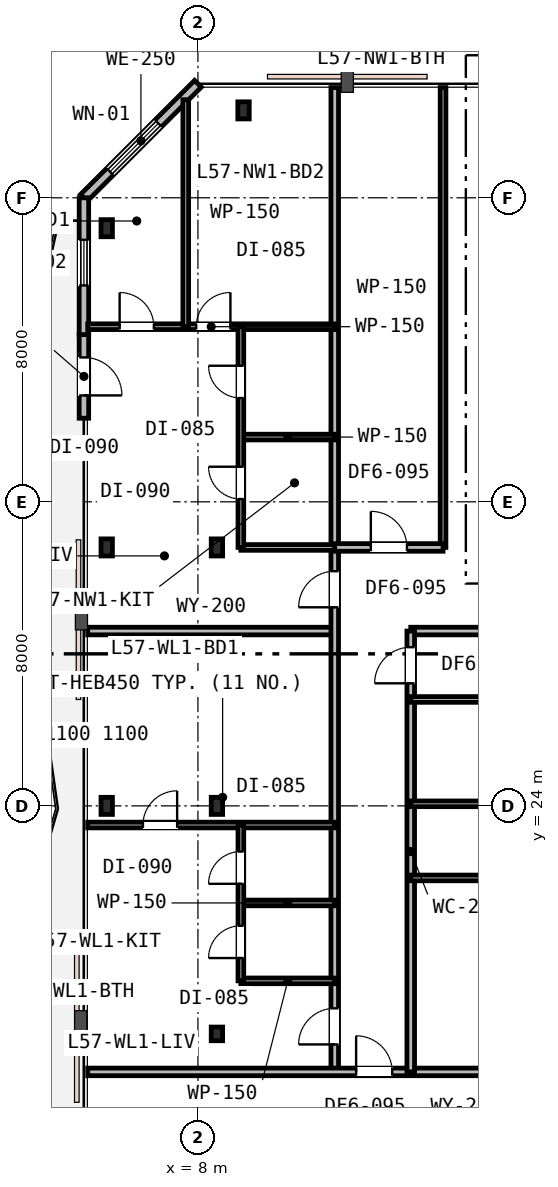
"""IFC4 building model, lengths in metres.
Left out: names, types, materials, properties, quantities, classifications, styles, units other than length and angle.
Written with IfcOpenShell. Run it as: python <this file> out.ifc"""

import sys

from ifc_helpers import new_model, si_unit, direction, frame, frame_2d, origin, origin_2d, place, context, subcontext, project, spatial, rectangle, i_section, extrude, element, fill, save


model = new_model("IFC4")
c1 = context("Model", 3, precision=1e-05, world=origin(), true_north=direction((0.0, 1.0)))
c2 = subcontext(c1, "Body", "Model", "MODEL_VIEW")
j1 = project(units=[si_unit("LENGTHUNIT", "METRE"), si_unit("PLANEANGLEUNIT", "RADIAN")], contexts=[c1])
p1 = place(None, origin())
s1 = spatial("IfcSite", under=j1, at=p1, CompositionType="ELEMENT")
p2 = place(p1, origin())
s2 = spatial("IfcBuilding", under=s1, at=p2, CompositionType="ELEMENT")
p3 = place(p2, frame((0.0, 0.0, 222.2)))
s3 = spatial("IfcBuildingStorey", under=s2, at=p3, CompositionType="ELEMENT", Elevation=222.2)
for number, where, z_axis, x_axis in (
    (1, (8.5, 24.0, 0.0), (0.0, 0.0, 1.0), (1.0, 0.0, 0.0)),
    (2, (5.6, 24.0, 0.0), (0.0, 0.0, 1.0), (1.0, 0.0, 0.0)),
    (3, (5.6, 30.8, 0.0), (0.0, 0.0, 1.0), (1.0, 0.0, 0.0)),
    (4, (5.6, 39.2, 0.0), (0.0, 0.0, 1.0), (1.0, 0.0, 0.0)),
    (5, (8.5, 30.8, 0.0), (0.0, 0.0, 1.0), (1.0, 0.0, 0.0)),
    (6, (9.2, 42.3, 0.0), (0.0, 0.0, 1.0), (1.0, 0.0, 0.0)),
):
    element("IfcColumn", number, at=place(p3, frame(where, z_axis=z_axis, x_axis=x_axis)), inside=s3, PredefinedType="COLUMN", context=c2, shape_type="SweptSolid", body=[
        extrude(i_section(OverallWidth=0.3, OverallDepth=0.45, WebThickness=0.014, FlangeThickness=0.026, FilletRadius=0.027, at=origin_2d()), origin(), (0.0, 0.0, 1.0), 3.8),
    ])
p4 = place(p3, frame((8.5, 18.0, 0.0), z_axis=(0.0, 0.0, 1.0), x_axis=(1.0, 0.0, 0.0)))
e7 = element("IfcColumn", 7, at=p4, inside=s3, PredefinedType="COLUMN", context=c2, shape_type="SweptSolid", body=[
    extrude(i_section(OverallWidth=0.3, OverallDepth=0.36, WebThickness=0.013, FlangeThickness=0.022, FilletRadius=0.027, at=origin_2d()), origin(), (0.0, 0.0, 1.0), 3.8),
])
p5 = place(p3, frame((8.0, 43.0, 0.0), z_axis=(0.0, 0.0, 1.0), x_axis=(-0.707106781187, -0.707106781187, 0.0)))
e8 = element("IfcWall", 8, at=p5, inside=s3, PredefinedType="STANDARD", context=c2, shape_type="SweptSolid", body=[
    extrude(rectangle(XDim=4.243, YDim=0.25, at=frame_2d((2.121, 0.0))), origin(), (0.0, 0.0, 1.0), 3.53),
])
p6 = place(p5, frame((1.473, 0.0, 0.75)))
e9 = element("IfcOpeningElement", 9, at=p6, cuts=e8, PredefinedType="OPENING", context=c2, shape_type="SweptSolid", body=[
    extrude(rectangle(XDim=1.8, YDim=1.85, at=frame_2d((0.9, 0.925))), frame((0.0, 0.135, 0.0), z_axis=(0.0, -1.0, 0.0), x_axis=(1.0, 0.0, 0.0)), (0.0, 0.0, 1.0), 0.27),
])
p7 = place(p3, frame((5.0, 36.4, 0.0), z_axis=(0.0, 0.0, 1.0), x_axis=(0.0, -1.0, 0.0)))
e10 = element("IfcWall", 10, at=p7, inside=s3, PredefinedType="STANDARD", context=c2, shape_type="SweptSolid", body=[
    extrude(rectangle(XDim=2.2, YDim=0.25, at=frame_2d((1.1, 0.0))), origin(), (0.0, 0.0, 1.0), 3.53),
])
p8 = place(p7, frame((0.6, 0.0, 0.0)))
e11 = element("IfcOpeningElement", 11, at=p8, cuts=e10, PredefinedType="OPENING", context=c2, shape_type="SweptSolid", body=[
    extrude(rectangle(XDim=1.0, YDim=2.15, at=frame_2d((0.5, 1.075))), frame((0.0, 0.135, 0.0), z_axis=(0.0, -1.0, 0.0), x_axis=(1.0, 0.0, 0.0)), (0.0, 0.0, 1.0), 0.27),
])
p9 = place(p3, frame((5.0, 40.0, 0.0), z_axis=(0.0, 0.0, 1.0), x_axis=(0.0, -1.0, 0.0)))
e12 = element("IfcWall", 12, at=p9, inside=s3, PredefinedType="STANDARD", context=c2, shape_type="SweptSolid", body=[
    extrude(rectangle(XDim=3.6, YDim=0.25, at=frame_2d((1.8, 0.0))), origin(), (0.0, 0.0, 1.0), 3.53),
])
p10 = place(p9, frame((1.106, 0.0, 0.85)))
e13 = element("IfcOpeningElement", 13, at=p10, cuts=e12, PredefinedType="OPENING", context=c2, shape_type="SweptSolid", body=[
    extrude(rectangle(XDim=1.2, YDim=1.6, at=frame_2d((0.6, 0.8))), frame((0.0, 0.135, 0.0), z_axis=(0.0, -1.0, 0.0), x_axis=(1.0, 0.0, 0.0)), (0.0, 0.0, 1.0), 0.27),
])
p11 = place(p3, frame((5.1, 28.6, 0.0), z_axis=(0.0, 0.0, 1.0), x_axis=(1.0, 0.0, 0.0)))
e14 = element("IfcWall", 14, at=p11, inside=s3, PredefinedType="PARTITIONING", context=c2, shape_type="SweptSolid", body=[
    extrude(rectangle(XDim=6.5, YDim=0.2, at=frame_2d((3.25, 0.0))), origin(), (0.0, 0.0, 1.0), 2.92),
])
p12 = place(p3, frame((13.6, 28.6, 0.0), z_axis=(0.0, 0.0, 1.0), x_axis=(1.0, 0.0, 0.0)))
e15 = element("IfcWall", 15, at=p12, inside=s3, PredefinedType="PARTITIONING", context=c2, shape_type="SweptSolid", body=[
    extrude(rectangle(XDim=32.3, YDim=0.2, at=frame_2d((16.15, 0.0))), origin(), (0.0, 0.0, 1.0), 2.92),
])
p13 = place(p12, frame((11.787, 0.0, 0.0)))
e16 = element("IfcOpeningElement", 16, at=p13, cuts=e15, PredefinedType="OPENING", context=c2, shape_type="SweptSolid", body=[
    extrude(rectangle(XDim=0.95, YDim=2.15, at=frame_2d((0.475, 1.075))), frame((0.0, 0.11, 0.0), z_axis=(0.0, -1.0, 0.0), x_axis=(1.0, 0.0, 0.0)), (0.0, 0.0, 1.0), 0.22),
])
p14 = place(p12, frame((25.8, 0.0, 0.0)))
e17 = element("IfcOpeningElement", 17, at=p14, cuts=e15, PredefinedType="OPENING", context=c2, shape_type="SweptSolid", body=[
    extrude(rectangle(XDim=0.95, YDim=2.15, at=frame_2d((0.475, 1.075))), frame((0.0, 0.11, 0.0), z_axis=(0.0, -1.0, 0.0), x_axis=(1.0, 0.0, 0.0)), (0.0, 0.0, 1.0), 0.22),
])
p15 = place(p3, frame((11.6, 17.0, 0.0), z_axis=(0.0, 0.0, 1.0), x_axis=(0.0, 1.0, 0.0)))
e18 = element("IfcWall", 18, at=p15, inside=s3, PredefinedType="PARTITIONING", context=c2, shape_type="SweptSolid", body=[
    extrude(rectangle(XDim=25.9, YDim=0.2, at=frame_2d((12.95, 0.0))), origin(), (0.0, 0.0, 1.0), 2.92),
])
p16 = place(p15, frame((12.225, 0.0, 0.0)))
e19 = element("IfcOpeningElement", 19, at=p16, cuts=e18, PredefinedType="OPENING", context=c2, shape_type="SweptSolid", body=[
    extrude(rectangle(XDim=0.95, YDim=2.15, at=frame_2d((0.475, 1.075))), frame((0.0, 0.11, 0.0), z_axis=(0.0, -1.0, 0.0), x_axis=(1.0, 0.0, 0.0)), (0.0, 0.0, 1.0), 0.22),
])
p17 = place(p15, frame((0.723, 0.0, 0.0)))
e20 = element("IfcOpeningElement", 20, at=p17, cuts=e18, PredefinedType="OPENING", context=c2, shape_type="SweptSolid", body=[
    extrude(rectangle(XDim=0.95, YDim=2.15, at=frame_2d((0.475, 1.075))), frame((0.0, 0.11, 0.0), z_axis=(0.0, -1.0, 0.0), x_axis=(1.0, 0.0, 0.0)), (0.0, 0.0, 1.0), 0.22),
])
p18 = place(p3, frame((9.13, 30.8, 0.0), z_axis=(0.0, 0.0, 1.0), x_axis=(1.0, 0.0, 0.0)))
e21 = element("IfcWall", 21, at=p18, inside=s3, PredefinedType="PARTITIONING", context=c2, shape_type="SweptSolid", body=[
    extrude(rectangle(XDim=2.47, YDim=0.15, at=frame_2d((1.235, 0.0))), origin(), (0.0, 0.0, 1.0), 2.92),
])
p19 = place(p3, frame((9.13, 33.704, 0.0), z_axis=(0.0, 0.0, 1.0), x_axis=(1.0, 0.0, 0.0)))
e22 = element("IfcWall", 22, at=p19, inside=s3, PredefinedType="PARTITIONING", context=c2, shape_type="SweptSolid", body=[
    extrude(rectangle(XDim=2.47, YDim=0.15, at=frame_2d((1.235, 0.0))), origin(), (0.0, 0.0, 1.0), 3.53),
])
p20 = place(p3, frame((5.1, 36.608, 0.0), z_axis=(0.0, 0.0, 1.0), x_axis=(1.0, 0.0, 0.0)))
e23 = element("IfcWall", 23, at=p20, inside=s3, PredefinedType="PARTITIONING", context=c2, shape_type="SweptSolid", body=[
    extrude(rectangle(XDim=6.5, YDim=0.15, at=frame_2d((3.25, 0.0))), origin(), (0.0, 0.0, 1.0), 3.24),
])
p21 = place(p20, frame((0.84, 0.0, 0.0)))
e24 = element("IfcOpeningElement", 24, at=p21, cuts=e23, PredefinedType="OPENING", context=c2, shape_type="SweptSolid", body=[
    extrude(rectangle(XDim=0.9, YDim=2.15, at=frame_2d((0.45, 1.075))), frame((0.0, 0.085, 0.0), z_axis=(0.0, -1.0, 0.0), x_axis=(1.0, 0.0, 0.0)), (0.0, 0.0, 1.0), 0.17),
])
p22 = place(p20, frame((2.855, 0.0, 0.0)))
e25 = element("IfcOpeningElement", 25, at=p22, cuts=e23, PredefinedType="OPENING", context=c2, shape_type="SweptSolid", body=[
    extrude(rectangle(XDim=0.9, YDim=2.15, at=frame_2d((0.45, 1.075))), frame((0.0, 0.085, 0.0), z_axis=(0.0, -1.0, 0.0), x_axis=(1.0, 0.0, 0.0)), (0.0, 0.0, 1.0), 0.17),
])
p23 = place(p3, frame((9.13, 30.8, 0.0), z_axis=(0.0, 0.0, 1.0), x_axis=(0.0, 1.0, 0.0)))
e26 = element("IfcWall", 26, at=p23, inside=s3, PredefinedType="PARTITIONING", context=c2, shape_type="SweptSolid", body=[
    extrude(rectangle(XDim=5.808, YDim=0.15, at=frame_2d((2.904, 0.0))), origin(), (0.0, 0.0, 1.0), 2.92),
])
p24 = place(p23, frame((1.274, 0.0, 0.0)))
e27 = element("IfcOpeningElement", 27, at=p24, cuts=e26, PredefinedType="OPENING", context=c2, shape_type="SweptSolid", body=[
    extrude(rectangle(XDim=0.85, YDim=2.15, at=frame_2d((0.425, 1.075))), frame((0.0, 0.085, 0.0), z_axis=(0.0, -1.0, 0.0), x_axis=(1.0, 0.0, 0.0)), (0.0, 0.0, 1.0), 0.17),
])
p25 = place(p23, frame((3.931, 0.0, 0.0)))
e28 = element("IfcOpeningElement", 28, at=p25, cuts=e26, PredefinedType="OPENING", context=c2, shape_type="SweptSolid", body=[
    extrude(rectangle(XDim=0.85, YDim=2.15, at=frame_2d((0.425, 1.075))), frame((0.0, 0.085, 0.0), z_axis=(0.0, -1.0, 0.0), x_axis=(1.0, 0.0, 0.0)), (0.0, 0.0, 1.0), 0.17),
])
p26 = place(p3, frame((7.68, 36.608, 0.0), z_axis=(0.0, 0.0, 1.0), x_axis=(0.0, 1.0, 0.0)))
e29 = element("IfcWall", 29, at=p26, inside=s3, PredefinedType="PARTITIONING", context=c2, shape_type="SweptSolid", body=[
    extrude(rectangle(XDim=5.972, YDim=0.15, at=frame_2d((2.986, 0.0))), origin(), (0.0, 0.0, 1.0), 3.24),
])
p27 = place(p3, frame((14.45, 30.8, 0.0), z_axis=(0.0, 0.0, 1.0), x_axis=(0.0, 1.0, 0.0)))
e30 = element("IfcWall", 30, at=p27, inside=s3, PredefinedType="PARTITIONING", context=c2, shape_type="SweptSolid", body=[
    extrude(rectangle(XDim=12.1, YDim=0.15, at=frame_2d((6.05, 0.0))), origin(), (0.0, 0.0, 1.0), 2.92),
])
p28 = place(p3, frame((11.6, 30.8, 0.0), z_axis=(0.0, 0.0, 1.0), x_axis=(1.0, 0.0, 0.0)))
e31 = element("IfcWall", 31, at=p28, inside=s3, PredefinedType="PARTITIONING", context=c2, shape_type="SweptSolid", body=[
    extrude(rectangle(XDim=2.85, YDim=0.2, at=frame_2d((1.425, 0.0))), origin(), (0.0, 0.0, 1.0), 2.92),
])
p29 = place(p28, frame((0.95, 0.0, 0.0)))
e32 = element("IfcOpeningElement", 32, at=p29, cuts=e31, PredefinedType="OPENING", context=c2, shape_type="SweptSolid", body=[
    extrude(rectangle(XDim=0.95, YDim=2.15, at=frame_2d((0.475, 1.075))), frame((0.0, 0.11, 0.0), z_axis=(0.0, -1.0, 0.0), x_axis=(1.0, 0.0, 0.0)), (0.0, 0.0, 1.0), 0.22),
])
p30 = place(p3, frame((5.1, 17.0, 0.0), z_axis=(0.0, 0.0, 1.0), x_axis=(1.0, 0.0, 0.0)))
e33 = element("IfcWall", 33, at=p30, inside=s3, PredefinedType="PARTITIONING", context=c2, shape_type="SweptSolid", body=[
    extrude(rectangle(XDim=18.8, YDim=0.2, at=frame_2d((9.4, 0.0))), origin(), (0.0, 0.0, 1.0), 2.92),
])
p31 = place(p30, frame((7.063, 0.0, 0.0)))
e34 = element("IfcOpeningElement", 34, at=p31, cuts=e33, PredefinedType="OPENING", context=c2, shape_type="SweptSolid", body=[
    extrude(rectangle(XDim=0.95, YDim=2.15, at=frame_2d((0.475, 1.075))), frame((0.0, 0.11, 0.0), z_axis=(0.0, -1.0, 0.0), x_axis=(1.0, 0.0, 0.0)), (0.0, 0.0, 1.0), 0.22),
])
for number, where, z_axis, x_axis in (
    (35, (9.13, 19.396, 0.0), (0.0, 0.0, 1.0), (1.0, 0.0, 0.0)),
    (36, (9.13, 21.446, 0.0), (0.0, 0.0, 1.0), (1.0, 0.0, 0.0)),
):
    element("IfcWall", number, at=place(p3, frame(where, z_axis=z_axis, x_axis=x_axis)), inside=s3, PredefinedType="PARTITIONING", context=c2, shape_type="SweptSolid", body=[
        extrude(rectangle(XDim=2.47, YDim=0.15, at=frame_2d((1.235, 0.0))), origin(), (0.0, 0.0, 1.0), 3.53),
    ])
p32 = place(p3, frame((5.1, 23.496, 0.0), z_axis=(0.0, 0.0, 1.0), x_axis=(1.0, 0.0, 0.0)))
e37 = element("IfcWall", 37, at=p32, inside=s3, PredefinedType="PARTITIONING", context=c2, shape_type="SweptSolid", body=[
    extrude(rectangle(XDim=6.5, YDim=0.15, at=frame_2d((3.25, 0.0))), origin(), (0.0, 0.0, 1.0), 2.92),
])
p33 = place(p32, frame((1.453, 0.0, 0.0)))
e38 = element("IfcOpeningElement", 38, at=p33, cuts=e37, PredefinedType="OPENING", context=c2, shape_type="SweptSolid", body=[
    extrude(rectangle(XDim=0.9, YDim=2.15, at=frame_2d((0.45, 1.075))), frame((0.0, 0.085, 0.0), z_axis=(0.0, -1.0, 0.0), x_axis=(1.0, 0.0, 0.0)), (0.0, 0.0, 1.0), 0.17),
])
p34 = place(p3, frame((9.13, 19.396, 0.0), z_axis=(0.0, 0.0, 1.0), x_axis=(0.0, 1.0, 0.0)))
e39 = element("IfcWall", 39, at=p34, inside=s3, PredefinedType="PARTITIONING", context=c2, shape_type="SweptSolid", body=[
    extrude(rectangle(XDim=4.1, YDim=0.15, at=frame_2d((2.05, 0.0))), origin(), (0.0, 0.0, 1.0), 2.92),
])
p35 = place(p34, frame((0.6, 0.0, 0.0)))
e40 = element("IfcOpeningElement", 40, at=p35, cuts=e39, PredefinedType="OPENING", context=c2, shape_type="SweptSolid", body=[
    extrude(rectangle(XDim=0.85, YDim=2.15, at=frame_2d((0.425, 1.075))), frame((0.0, 0.085, 0.0), z_axis=(0.0, -1.0, 0.0), x_axis=(1.0, 0.0, 0.0)), (0.0, 0.0, 1.0), 0.17),
])
p36 = place(p34, frame((2.553, 0.0, 0.0)))
e41 = element("IfcOpeningElement", 41, at=p36, cuts=e39, PredefinedType="OPENING", context=c2, shape_type="SweptSolid", body=[
    extrude(rectangle(XDim=0.85, YDim=2.15, at=frame_2d((0.425, 1.075))), frame((0.0, 0.085, 0.0), z_axis=(0.0, -1.0, 0.0), x_axis=(1.0, 0.0, 0.0)), (0.0, 0.0, 1.0), 0.17),
])
p37 = place(p3, frame((13.6, 17.0, 0.0), z_axis=(0.0, 0.0, 1.0), x_axis=(0.0, 1.0, 0.0)))
e42 = element("IfcWall", 42, at=p37, inside=s3, PredefinedType="PARTITIONING", context=c2, shape_type="SweptSolid", body=[
    extrude(rectangle(XDim=11.6, YDim=0.2, at=frame_2d((5.8, 0.0))), origin(), (0.0, 0.0, 1.0), 2.92),
])
p38 = place(p37, frame((10.225, 0.0, 0.0)))
e43 = element("IfcOpeningElement", 43, at=p38, cuts=e42, PredefinedType="OPENING", context=c2, shape_type="SweptSolid", body=[
    extrude(rectangle(XDim=0.95, YDim=2.15, at=frame_2d((0.475, 1.075))), frame((0.0, 0.11, 0.0), z_axis=(0.0, -1.0, 0.0), x_axis=(1.0, 0.0, 0.0)), (0.0, 0.0, 1.0), 0.22),
])
p39 = place(p3, frame((13.6, 22.104, 0.0), z_axis=(0.0, 0.0, 1.0), x_axis=(1.0, 0.0, 0.0)))
e44 = element("IfcWall", 44, at=p39, inside=s3, PredefinedType="PARTITIONING", context=c2, shape_type="SweptSolid", body=[
    extrude(rectangle(XDim=10.3, YDim=0.15, at=frame_2d((5.15, 0.0))), origin(), (0.0, 0.0, 1.0), 2.92),
])
p40 = place(p39, frame((6.325, 0.0, 0.0)))
e45 = element("IfcOpeningElement", 45, at=p40, cuts=e44, PredefinedType="OPENING", context=c2, shape_type="SweptSolid", body=[
    extrude(rectangle(XDim=0.9, YDim=2.15, at=frame_2d((0.45, 1.075))), frame((0.0, 0.085, 0.0), z_axis=(0.0, -1.0, 0.0), x_axis=(1.0, 0.0, 0.0)), (0.0, 0.0, 1.0), 0.17),
])
for number, where, z_axis, x_axis in (
    (46, (13.6, 24.054, 0.0), (0.0, 0.0, 1.0), (1.0, 0.0, 0.0)),
    (47, (13.6, 26.8, 0.0), (0.0, 0.0, 1.0), (1.0, 0.0, 0.0)),
):
    element("IfcWall", number, at=place(p3, frame(where, z_axis=z_axis, x_axis=x_axis)), inside=s3, PredefinedType="PARTITIONING", context=c2, shape_type="SweptSolid", body=[
        extrude(rectangle(XDim=3.25, YDim=0.15, at=frame_2d((1.625, 0.0))), origin(), (0.0, 0.0, 1.0), 2.92),
    ])
p41 = place(p6, origin())
e48 = element("IfcWindow", 48, at=p41, inside=s3, PartitioningType="SINGLE_PANEL", PredefinedType="WINDOW", context=c2, shape_type="SweptSolid", body=[
    extrude(rectangle(XDim=1.8, YDim=1.85, at=frame_2d((0.9, 0.925))), frame((0.0, 0.03, 0.0), z_axis=(0.0, -1.0, 0.0), x_axis=(1.0, 0.0, 0.0)), (0.0, 0.0, 1.0), 0.06),
])
fill(e9, e48)
p42 = place(p8, origin())
e49 = element("IfcDoor", 49, at=p42, inside=s3, OperationType="SINGLE_SWING_RIGHT", PredefinedType="DOOR", context=c2, shape_type="SweptSolid", body=[
    extrude(rectangle(XDim=1.0, YDim=2.15, at=frame_2d((0.5, 1.075))), frame((0.0, 0.025, 0.0), z_axis=(0.0, -1.0, 0.0), x_axis=(1.0, 0.0, 0.0)), (0.0, 0.0, 1.0), 0.05),
])
fill(e11, e49)
p43 = place(p10, origin())
e50 = element("IfcWindow", 50, at=p43, inside=s3, PartitioningType="SINGLE_PANEL", PredefinedType="WINDOW", context=c2, shape_type="SweptSolid", body=[
    extrude(rectangle(XDim=1.2, YDim=1.6, at=frame_2d((0.6, 0.8))), frame((0.0, 0.03, 0.0), z_axis=(0.0, -1.0, 0.0), x_axis=(1.0, 0.0, 0.0)), (0.0, 0.0, 1.0), 0.06),
])
fill(e13, e50)
p44 = place(p16, origin())
e51 = element("IfcDoor", 51, at=p44, inside=s3, OperationType="SINGLE_SWING_LEFT", PredefinedType="DOOR", context=c2, shape_type="SweptSolid", body=[
    extrude(rectangle(XDim=0.95, YDim=2.15, at=frame_2d((0.475, 1.075))), frame((0.0, 0.025, 0.0), z_axis=(0.0, -1.0, 0.0), x_axis=(1.0, 0.0, 0.0)), (0.0, 0.0, 1.0), 0.05),
])
fill(e19, e51)
p45 = place(p24, origin())
e52 = element("IfcDoor", 52, at=p45, inside=s3, OperationType="SINGLE_SWING_RIGHT", PredefinedType="DOOR", context=c2, shape_type="SweptSolid", body=[
    extrude(rectangle(XDim=0.85, YDim=2.15, at=frame_2d((0.425, 1.075))), frame((0.0, 0.025, 0.0), z_axis=(0.0, -1.0, 0.0), x_axis=(1.0, 0.0, 0.0)), (0.0, 0.0, 1.0), 0.05),
])
fill(e27, e52)
p46 = place(p25, origin())
e53 = element("IfcDoor", 53, at=p46, inside=s3, OperationType="SINGLE_SWING_RIGHT", PredefinedType="DOOR", context=c2, shape_type="SweptSolid", body=[
    extrude(rectangle(XDim=0.85, YDim=2.15, at=frame_2d((0.425, 1.075))), frame((0.0, 0.025, 0.0), z_axis=(0.0, -1.0, 0.0), x_axis=(1.0, 0.0, 0.0)), (0.0, 0.0, 1.0), 0.05),
])
fill(e28, e53)
p47 = place(p21, origin())
e54 = element("IfcDoor", 54, at=p47, inside=s3, OperationType="SINGLE_SWING_LEFT", PredefinedType="DOOR", context=c2, shape_type="SweptSolid", body=[
    extrude(rectangle(XDim=0.9, YDim=2.15, at=frame_2d((0.45, 1.075))), frame((0.0, 0.025, 0.0), z_axis=(0.0, -1.0, 0.0), x_axis=(1.0, 0.0, 0.0)), (0.0, 0.0, 1.0), 0.05),
])
fill(e24, e54)
p48 = place(p22, origin())
e55 = element("IfcDoor", 55, at=p48, inside=s3, OperationType="SINGLE_SWING_RIGHT", PredefinedType="DOOR", context=c2, shape_type="SweptSolid", body=[
    extrude(rectangle(XDim=0.9, YDim=2.15, at=frame_2d((0.45, 1.075))), frame((0.0, 0.025, 0.0), z_axis=(0.0, -1.0, 0.0), x_axis=(1.0, 0.0, 0.0)), (0.0, 0.0, 1.0), 0.05),
])
fill(e25, e55)
p49 = place(p29, origin())
e56 = element("IfcDoor", 56, at=p49, inside=s3, OperationType="SINGLE_SWING_LEFT", PredefinedType="DOOR", context=c2, shape_type="SweptSolid", body=[
    extrude(rectangle(XDim=0.95, YDim=2.15, at=frame_2d((0.475, 1.075))), frame((0.0, 0.025, 0.0), z_axis=(0.0, -1.0, 0.0), x_axis=(1.0, 0.0, 0.0)), (0.0, 0.0, 1.0), 0.05),
])
fill(e32, e56)
p50 = place(p17, origin())
e57 = element("IfcDoor", 57, at=p50, inside=s3, OperationType="SINGLE_SWING_LEFT", PredefinedType="DOOR", context=c2, shape_type="SweptSolid", body=[
    extrude(rectangle(XDim=0.95, YDim=2.15, at=frame_2d((0.475, 1.075))), frame((0.0, 0.025, 0.0), z_axis=(0.0, -1.0, 0.0), x_axis=(1.0, 0.0, 0.0)), (0.0, 0.0, 1.0), 0.05),
])
fill(e20, e57)
p51 = place(p35, origin())
e58 = element("IfcDoor", 58, at=p51, inside=s3, OperationType="SINGLE_SWING_LEFT", PredefinedType="DOOR", context=c2, shape_type="SweptSolid", body=[
    extrude(rectangle(XDim=0.85, YDim=2.15, at=frame_2d((0.425, 1.075))), frame((0.0, 0.025, 0.0), z_axis=(0.0, -1.0, 0.0), x_axis=(1.0, 0.0, 0.0)), (0.0, 0.0, 1.0), 0.05),
])
fill(e40, e58)
p52 = place(p36, origin())
e59 = element("IfcDoor", 59, at=p52, inside=s3, OperationType="SINGLE_SWING_LEFT", PredefinedType="DOOR", context=c2, shape_type="SweptSolid", body=[
    extrude(rectangle(XDim=0.85, YDim=2.15, at=frame_2d((0.425, 1.075))), frame((0.0, 0.025, 0.0), z_axis=(0.0, -1.0, 0.0), x_axis=(1.0, 0.0, 0.0)), (0.0, 0.0, 1.0), 0.05),
])
fill(e41, e59)
p53 = place(p33, origin())
e60 = element("IfcDoor", 60, at=p53, inside=s3, OperationType="SINGLE_SWING_RIGHT", PredefinedType="DOOR", context=c2, shape_type="SweptSolid", body=[
    extrude(rectangle(XDim=0.9, YDim=2.15, at=frame_2d((0.45, 1.075))), frame((0.0, 0.025, 0.0), z_axis=(0.0, -1.0, 0.0), x_axis=(1.0, 0.0, 0.0)), (0.0, 0.0, 1.0), 0.05),
])
fill(e38, e60)
p54 = place(p38, origin())
e61 = element("IfcDoor", 61, at=p54, inside=s3, OperationType="SINGLE_SWING_LEFT", PredefinedType="DOOR", context=c2, shape_type="SweptSolid", body=[
    extrude(rectangle(XDim=0.95, YDim=2.15, at=frame_2d((0.475, 1.075))), frame((0.0, 0.025, 0.0), z_axis=(0.0, -1.0, 0.0), x_axis=(1.0, 0.0, 0.0)), (0.0, 0.0, 1.0), 0.05),
])
fill(e43, e61)
p55 = place(p31, origin())
e62 = element("IfcDoor", 62, at=p55, inside=s3, OperationType="SINGLE_SWING_LEFT", PredefinedType="DOOR", context=c2, shape_type="SweptSolid", body=[
    extrude(rectangle(XDim=0.95, YDim=2.15, at=frame_2d((0.475, 1.075))), frame((0.0, 0.025, 0.0), z_axis=(0.0, -1.0, 0.0), x_axis=(1.0, 0.0, 0.0)), (0.0, 0.0, 1.0), 0.05),
])
fill(e34, e62)
save(model, sys.argv[1])
